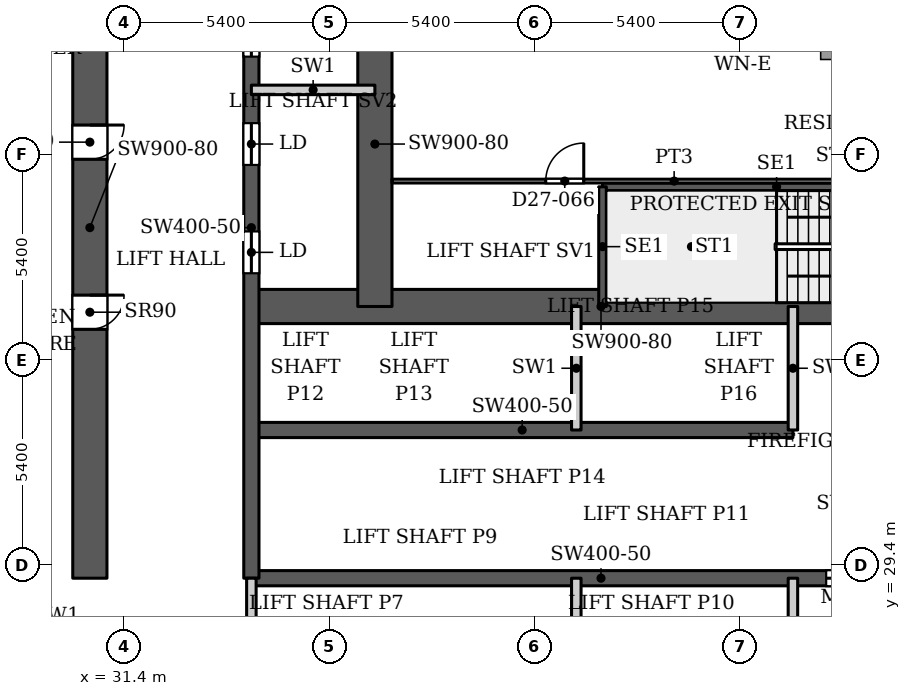
"""IFC4 building model, lengths in metres.
Left out: names, types, materials, properties, quantities, classifications, styles, units other than length and angle.
Written with IfcOpenShell. Run it as: python <this file> out.ifc"""

import sys

from ifc_helpers import new_model, si_unit, direction, frame, frame_2d, origin, place, context, subcontext, project, spatial, rectangle, extrude, source, transform, mapped, element, fill, save


model = new_model("IFC4")
c1 = context("Model", 3, precision=1e-05, world=origin(), true_north=direction((0.0, 1.0)))
c2 = subcontext(c1, "Body", "Model", "MODEL_VIEW")
j1 = project(units=[si_unit("LENGTHUNIT", "METRE"), si_unit("PLANEANGLEUNIT", "RADIAN")], contexts=[c1])
p1 = place(None, origin())
s1 = spatial("IfcSite", under=j1, at=p1, CompositionType="ELEMENT")
p2 = place(p1, origin())
s2 = spatial("IfcBuilding", under=s1, at=p2, CompositionType="ELEMENT")
p3 = place(p2, frame((0.0, 0.0, 121.4)))
s3 = spatial("IfcBuildingStorey", under=s2, at=p3, CompositionType="ELEMENT", Elevation=121.4)
p4 = place(p3, frame((34.75, 29.05, 0.0), z_axis=(0.0, 0.0, 1.0), x_axis=(1.0, 0.0, 0.0)))
e1 = element("IfcWall", 1, at=p4, inside=s3, PredefinedType="SHEAR", context=c2, shape_type="SweptSolid", body=[
    extrude(rectangle(XDim=18.4, YDim=0.4, at=frame_2d((9.2, 0.0))), origin(), (0.0, 0.0, 1.0), 3.9),
])
p5 = place(p4, frame((15.125, 0.0, 0.0)))
e2 = element("IfcOpeningElement", 2, at=p5, cuts=e1, PredefinedType="OPENING", context=c2, shape_type="SweptSolid", body=[
    extrude(rectangle(XDim=1.1, YDim=2.2, at=frame_2d((0.55, 1.1))), frame((0.0, 0.21, 0.0), z_axis=(0.0, -1.0, 0.0), x_axis=(1.0, 0.0, 0.0)), (0.0, 0.0, 1.0), 0.42),
])
p6 = place(p3, frame((34.75, 32.95, 0.0), z_axis=(0.0, 0.0, 1.0), x_axis=(1.0, 0.0, 0.0)))
e3 = element("IfcWall", 3, at=p6, inside=s3, PredefinedType="SHEAR", context=c2, shape_type="SweptSolid", body=[
    extrude(rectangle(XDim=14.25, YDim=0.4, at=frame_2d((7.125, 0.0))), origin(), (0.0, 0.0, 1.0), 3.9),
])
p7 = place(p3, frame((34.75, 36.2, 0.0), z_axis=(0.0, 0.0, 1.0), x_axis=(1.0, 0.0, 0.0)))
e4 = element("IfcWall", 4, at=p7, inside=s3, PredefinedType="SHEAR", context=c2, shape_type="SweptSolid", body=[
    extrude(rectangle(XDim=18.4, YDim=0.9, at=frame_2d((9.2, 0.0))), origin(), (0.0, 0.0, 1.0), 3.9),
])
p8 = place(p7, frame((16.9, 0.0, 0.0)))
e5 = element("IfcOpeningElement", 5, at=p8, cuts=e4, PredefinedType="OPENING", context=c2, shape_type="SweptSolid", body=[
    extrude(rectangle(XDim=1.0, YDim=2.2, at=frame_2d((0.5, 1.1))), frame((0.0, 0.46, 0.0), z_axis=(0.0, -1.0, 0.0), x_axis=(1.0, 0.0, 0.0)), (0.0, 0.0, 1.0), 0.92),
])
p9 = place(p3, frame((34.75, 29.05, 0.0), z_axis=(0.0, 0.0, 1.0), x_axis=(0.0, 1.0, 0.0)))
e6 = element("IfcWall", 6, at=p9, inside=s3, PredefinedType="SHEAR", context=c2, shape_type="SweptSolid", body=[
    extrude(rectangle(XDim=18.45, YDim=0.4, at=frame_2d((9.225, 0.0))), origin(), (0.0, 0.0, 1.0), 3.9),
])
p10 = place(p9, frame((8.025, 0.0, 0.0)))
e7 = element("IfcOpeningElement", 7, at=p10, cuts=e6, PredefinedType="OPENING", context=c2, shape_type="SweptSolid", body=[
    extrude(rectangle(XDim=1.1, YDim=2.2, at=frame_2d((0.55, 1.1))), frame((0.0, 0.21, 0.0), z_axis=(0.0, -1.0, 0.0), x_axis=(1.0, 0.0, 0.0)), (0.0, 0.0, 1.0), 0.42),
])
p11 = place(p9, frame((10.875, 0.0, 0.0)))
e8 = element("IfcOpeningElement", 8, at=p11, cuts=e6, PredefinedType="OPENING", context=c2, shape_type="SweptSolid", body=[
    extrude(rectangle(XDim=1.1, YDim=2.2, at=frame_2d((0.55, 1.1))), frame((0.0, 0.21, 0.0), z_axis=(0.0, -1.0, 0.0), x_axis=(1.0, 0.0, 0.0)), (0.0, 0.0, 1.0), 0.42),
])
p12 = place(p9, frame((13.725, 0.0, 0.0)))
e9 = element("IfcOpeningElement", 9, at=p12, cuts=e6, PredefinedType="OPENING", context=c2, shape_type="SweptSolid", body=[
    extrude(rectangle(XDim=1.1, YDim=2.2, at=frame_2d((0.55, 1.1))), frame((0.0, 0.21, 0.0), z_axis=(0.0, -1.0, 0.0), x_axis=(1.0, 0.0, 0.0)), (0.0, 0.0, 1.0), 0.42),
])
p13 = place(p9, frame((15.95, 0.0, 0.0)))
e10 = element("IfcOpeningElement", 10, at=p13, cuts=e6, PredefinedType="OPENING", context=c2, shape_type="SweptSolid", body=[
    extrude(rectangle(XDim=1.1, YDim=2.2, at=frame_2d((0.55, 1.1))), frame((0.0, 0.21, 0.0), z_axis=(0.0, -1.0, 0.0), x_axis=(1.0, 0.0, 0.0)), (0.0, 0.0, 1.0), 0.42),
])
p14 = place(p3, frame((38.0, 36.2, 0.0), z_axis=(0.0, 0.0, 1.0), x_axis=(0.0, 1.0, 0.0)))
e11 = element("IfcWall", 11, at=p14, inside=s3, PredefinedType="SHEAR", context=c2, shape_type="SweptSolid", body=[
    extrude(rectangle(XDim=8.55, YDim=0.9, at=frame_2d((4.275, 0.0))), origin(), (0.0, 0.0, 1.0), 3.9),
])
p15 = place(p3, frame((30.5, 29.05, 0.0), z_axis=(0.0, 0.0, 1.0), x_axis=(0.0, 1.0, 0.0)))
e12 = element("IfcWall", 12, at=p15, inside=s3, PredefinedType="SHEAR", context=c2, shape_type="SweptSolid", body=[
    extrude(rectangle(XDim=18.45, YDim=0.9, at=frame_2d((9.225, 0.0))), origin(), (0.0, 0.0, 1.0), 3.9),
])
p16 = place(p15, frame((6.55, 0.0, 0.0)))
e13 = element("IfcOpeningElement", 13, at=p16, cuts=e12, PredefinedType="OPENING", context=c2, shape_type="SweptSolid", body=[
    extrude(rectangle(XDim=0.9, YDim=2.2, at=frame_2d((0.45, 1.1))), frame((0.0, 0.46, 0.0), z_axis=(0.0, -1.0, 0.0), x_axis=(1.0, 0.0, 0.0)), (0.0, 0.0, 1.0), 0.92),
])
p17 = place(p15, frame((11.025, 0.0, 0.0)))
e14 = element("IfcOpeningElement", 14, at=p17, cuts=e12, PredefinedType="OPENING", context=c2, shape_type="SweptSolid", body=[
    extrude(rectangle(XDim=0.9, YDim=2.2, at=frame_2d((0.45, 1.1))), frame((0.0, 0.46, 0.0), z_axis=(0.0, -1.0, 0.0), x_axis=(1.0, 0.0, 0.0)), (0.0, 0.0, 1.0), 0.92),
])
p18 = place(p3, frame((29.712, 26.072, 0.0), z_axis=(0.0, 0.0, 1.0), x_axis=(-0.511028049012, 0.859564036662, 0.0)))
e15 = element("IfcWall", 15, at=p18, inside=s3, PredefinedType="SOLIDWALL", context=c2, shape_type="SweptSolid", body=[
    extrude(rectangle(XDim=4.634, YDim=0.25, at=frame_2d((2.317, 0.0))), origin(), (0.0, 0.0, 1.0), 3.147),
])
p19 = place(p3, frame((27.195, 31.969, 0.0), z_axis=(0.0, 0.0, 1.0), x_axis=(0.052554995867, 0.998618031286, 0.0)))
e16 = element("IfcWall", 16, at=p19, inside=s3, PredefinedType="SOLIDWALL", context=c2, shape_type="SweptSolid", body=[
    extrude(rectangle(XDim=66.787, YDim=0.25, at=frame_2d((33.394, 0.0))), origin(), (0.0, 0.0, 1.0), 3.75),
])
p20 = place(p3, frame((43.99, 39.35, 0.0), z_axis=(0.0, 0.0, 1.0), x_axis=(1.0, 0.0, 0.0)))
e17 = element("IfcWall", 17, at=p20, inside=s3, PredefinedType="SHEAR", context=c2, shape_type="SweptSolid", body=[
    extrude(rectangle(XDim=9.16, YDim=0.2, at=frame_2d((4.58, 0.0))), origin(), (0.0, 0.0, 1.0), 3.9),
])
p21 = place(p3, frame((43.99, 36.2, 0.0), z_axis=(0.0, 0.0, 1.0), x_axis=(0.0, 1.0, 0.0)))
e18 = element("IfcWall", 18, at=p21, inside=s3, PredefinedType="SHEAR", context=c2, shape_type="SweptSolid", body=[
    extrude(rectangle(XDim=3.15, YDim=0.2, at=frame_2d((1.575, 0.0))), origin(), (0.0, 0.0, 1.0), 3.9),
])
for number, where, z_axis, x_axis in (
    (19, (34.75, 25.8, 0.0), (0.0, 0.0, 1.0), (0.0, 1.0, 0.0)),
    (20, (43.3, 25.8, 0.0), (0.0, 0.0, 1.0), (0.0, 1.0, 0.0)),
    (21, (43.3, 32.95, 0.0), (0.0, 0.0, 1.0), (0.0, 1.0, 0.0)),
    (22, (49.0, 25.8, 0.0), (0.0, 0.0, 1.0), (0.0, 1.0, 0.0)),
    (23, (49.0, 32.95, 0.0), (0.0, 0.0, 1.0), (0.0, 1.0, 0.0)),
    (24, (34.75, 41.9, 0.0), (0.0, 0.0, 1.0), (1.0, 0.0, 0.0)),
):
    element("IfcWall", number, at=place(p3, frame(where, z_axis=z_axis, x_axis=x_axis)), inside=s3, PredefinedType="PARTITIONING", context=c2, shape_type="SweptSolid", body=[
        extrude(rectangle(XDim=3.25, YDim=0.25, at=frame_2d((1.625, 0.0))), origin(), (0.0, 0.0, 1.0), 3.9),
    ])
p22 = place(p3, frame((38.449, 39.5, 0.0), z_axis=(0.0, 0.0, 1.0), x_axis=(1.0, 0.0, 0.0)))
e25 = element("IfcWall", 25, at=p22, inside=s3, PredefinedType="PARTITIONING", context=c2, shape_type="SweptSolid", body=[
    extrude(rectangle(XDim=14.851, YDim=0.1, at=frame_2d((7.426, 0.0))), origin(), (0.0, 0.0, 1.0), 3.6),
])
p23 = place(p22, frame((4.047, 0.0, 0.0)))
e26 = element("IfcOpeningElement", 26, at=p23, cuts=e25, PredefinedType="OPENING", context=c2, shape_type="SweptSolid", body=[
    extrude(rectangle(XDim=1.0, YDim=2.1, at=frame_2d((0.5, 1.05))), frame((0.0, 0.06, 0.0), z_axis=(0.0, -1.0, 0.0), x_axis=(1.0, 0.0, 0.0)), (0.0, 0.0, 1.0), 0.12),
])
m1 = source(origin(), c2, "Body", "SweptSolid", [
    extrude(rectangle(XDim=1.1, YDim=2.2, at=frame_2d((0.55, 1.1))), frame((0.0, 0.025, 0.0), z_axis=(0.0, -1.0, 0.0), x_axis=(1.0, 0.0, 0.0)), (0.0, 0.0, 1.0), 0.05),
])
p24 = place(p10, origin())
e27 = element("IfcDoor", 27, at=p24, inside=s3, OperationType="SLIDING_TO_LEFT", PredefinedType="DOOR", context=c2, shape_type="MappedRepresentation", body=[
    mapped(m1, transform((0.0, 0.0, 0.0), x_axis=(1.0, 0.0, 0.0), y_axis=(0.0, 1.0, 0.0), z_axis=(0.0, 0.0, 1.0), scale=1.0)),
])
fill(e7, e27)
p25 = place(p11, origin())
e28 = element("IfcDoor", 28, at=p25, inside=s3, OperationType="SLIDING_TO_LEFT", PredefinedType="DOOR", context=c2, shape_type="MappedRepresentation", body=[
    mapped(m1, transform((0.0, 0.0, 0.0), x_axis=(1.0, 0.0, 0.0), y_axis=(0.0, 1.0, 0.0), z_axis=(0.0, 0.0, 1.0), scale=1.0)),
])
fill(e8, e28)
p26 = place(p12, origin())
e29 = element("IfcDoor", 29, at=p26, inside=s3, OperationType="SLIDING_TO_LEFT", PredefinedType="DOOR", context=c2, shape_type="MappedRepresentation", body=[
    mapped(m1, transform((0.0, 0.0, 0.0), x_axis=(1.0, 0.0, 0.0), y_axis=(0.0, 1.0, 0.0), z_axis=(0.0, 0.0, 1.0), scale=1.0)),
])
fill(e9, e29)
p27 = place(p5, origin())
e30 = element("IfcDoor", 30, at=p27, inside=s3, OperationType="SLIDING_TO_LEFT", PredefinedType="DOOR", context=c2, shape_type="MappedRepresentation", body=[
    mapped(m1, transform((0.0, 0.0, 0.0), x_axis=(1.0, 0.0, 0.0), y_axis=(0.0, 1.0, 0.0), z_axis=(0.0, 0.0, 1.0), scale=1.0)),
])
fill(e2, e30)
m2 = source(origin(), c2, "Body", "SweptSolid", [
    extrude(rectangle(XDim=0.9, YDim=2.2, at=frame_2d((0.45, 1.1))), frame((0.0, 0.025, 0.0), z_axis=(0.0, -1.0, 0.0), x_axis=(1.0, 0.0, 0.0)), (0.0, 0.0, 1.0), 0.05),
])
p28 = place(p16, origin())
e31 = element("IfcDoor", 31, at=p28, inside=s3, OperationType="SINGLE_SWING_RIGHT", PredefinedType="DOOR", context=c2, shape_type="MappedRepresentation", body=[
    mapped(m2, transform((0.0, 0.0, 0.0), x_axis=(1.0, 0.0, 0.0), y_axis=(0.0, 1.0, 0.0), z_axis=(0.0, 0.0, 1.0), scale=1.0)),
])
fill(e13, e31)
p29 = place(p17, origin())
e32 = element("IfcDoor", 32, at=p29, inside=s3, OperationType="SINGLE_SWING_RIGHT", PredefinedType="DOOR", context=c2, shape_type="MappedRepresentation", body=[
    mapped(m2, transform((0.0, 0.0, 0.0), x_axis=(1.0, 0.0, 0.0), y_axis=(0.0, 1.0, 0.0), z_axis=(0.0, 0.0, 1.0), scale=1.0)),
])
fill(e14, e32)
m3 = source(origin(), c2, "Body", "SweptSolid", [
    extrude(rectangle(XDim=1.0, YDim=2.1, at=frame_2d((0.5, 1.05))), frame((0.0, 0.025, 0.0), z_axis=(0.0, -1.0, 0.0), x_axis=(1.0, 0.0, 0.0)), (0.0, 0.0, 1.0), 0.05),
])
p30 = place(p23, origin())
e33 = element("IfcDoor", 33, at=p30, inside=s3, OperationType="SINGLE_SWING_LEFT", PredefinedType="DOOR", context=c2, shape_type="MappedRepresentation", body=[
    mapped(m3, transform((0.0, 0.0, 0.0), x_axis=(1.0, 0.0, 0.0), y_axis=(0.0, 1.0, 0.0), z_axis=(0.0, 0.0, 1.0), scale=1.0)),
])
fill(e26, e33)
save(model, sys.argv[1])
